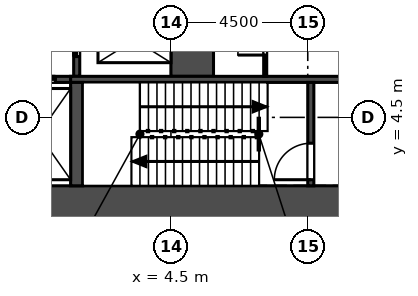
"""IFC4 building model, lengths in metres.
Left out: names, types, materials, properties, quantities, classifications, styles, units other than length and angle.
Written with IfcOpenShell. Run it as: python <this file> out.ifc"""

import sys

from ifc_helpers import new_model, si_unit, direction, frame, frame_2d, origin, place, context, subcontext, project, spatial, rectangle, extrude, element, fill, save


model = new_model("IFC4")
c1 = context("Model", 3, precision=1e-05, world=origin(), true_north=direction((0.0, 1.0)))
c2 = subcontext(c1, "Body", "Model", "MODEL_VIEW")
j1 = project(units=[si_unit("LENGTHUNIT", "METRE"), si_unit("PLANEANGLEUNIT", "RADIAN")], contexts=[c1])
p1 = place(None, origin())
s1 = spatial("IfcSite", under=j1, at=p1, CompositionType="ELEMENT")
p2 = place(p1, origin())
s2 = spatial("IfcBuilding", under=s1, at=p2, CompositionType="ELEMENT")
p3 = place(p2, frame((0.0, 0.0, 20.0)))
s3 = spatial("IfcBuildingStorey", under=s2, at=p3, CompositionType="ELEMENT", Elevation=20.0)
p4 = place(p3, frame((-14.0, 1.55, 0.0), z_axis=(0.0, 0.0, 1.0), x_axis=(1.0, 0.0, 0.0)))
e1 = element("IfcWall", 1, at=p4, inside=s3, PredefinedType="SHEAR", context=c2, shape_type="SweptSolid", body=[
    extrude(rectangle(XDim=28.0, YDim=1.4, at=frame_2d((14.0, 0.0))), origin(), (0.0, 0.0, 1.0), 5.0),
])
p5 = place(p3, frame((1.4, 5.85, -0.3), z_axis=(0.0, 0.0, 1.0), x_axis=(0.0, 1.0, 0.0)))
e2 = element("IfcWall", 2, at=p5, inside=s3, PredefinedType="SOLIDWALL", context=c2, shape_type="SweptSolid", body=[
    extrude(rectangle(XDim=11.75, YDim=0.2, at=frame_2d((5.875, 0.0))), origin(), (0.0, 0.0, 1.0), 3.3),
])
p6 = place(p5, frame((0.65, 0.0, 0.3)))
e3 = element("IfcOpeningElement", 3, at=p6, cuts=e2, PredefinedType="OPENING", context=c2, shape_type="SweptSolid", body=[
    extrude(rectangle(XDim=1.1, YDim=2.1, at=frame_2d((0.55, 1.05))), frame((0.0, 0.11, 0.0), z_axis=(0.0, -1.0, 0.0), x_axis=(1.0, 0.0, 0.0)), (0.0, 0.0, 1.0), 0.22),
])
p7 = place(p5, frame((3.3, 0.0, 0.3)))
e4 = element("IfcOpeningElement", 4, at=p7, cuts=e2, PredefinedType="OPENING", context=c2, shape_type="SweptSolid", body=[
    extrude(rectangle(XDim=1.0, YDim=2.1, at=frame_2d((0.5, 1.05))), frame((0.0, 0.11, 0.0), z_axis=(0.0, -1.0, 0.0), x_axis=(1.0, 0.0, 0.0)), (0.0, 0.0, 1.0), 0.22),
])
p8 = place(p3, frame((5.2, 5.85, -0.3), z_axis=(0.0, 0.0, 1.0), x_axis=(0.0, 1.0, 0.0)))
e5 = element("IfcWall", 5, at=p8, inside=s3, PredefinedType="SOLIDWALL", context=c2, shape_type="SweptSolid", body=[
    extrude(rectangle(XDim=2.4, YDim=1.4, at=frame_2d((1.2, 0.0))), origin(), (0.0, 0.0, 1.0), 3.3),
])
p9 = place(p3, frame((-1.2, 5.75, -0.3), z_axis=(0.0, 0.0, 1.0), x_axis=(1.0, 0.0, 0.0)))
e6 = element("IfcWall", 6, at=p9, inside=s3, PredefinedType="SOLIDWALL", context=c2, shape_type="SweptSolid", body=[
    extrude(rectangle(XDim=2.4, YDim=0.2, at=frame_2d((1.2, 0.0))), origin(), (0.0, 0.0, 1.0), 3.3),
])
p10 = place(p9, frame((0.5, 0.0, 0.3)))
e7 = element("IfcOpeningElement", 7, at=p10, cuts=e6, PredefinedType="OPENING", context=c2, shape_type="SweptSolid", body=[
    extrude(rectangle(XDim=1.4, YDim=2.1, at=frame_2d((0.7, 1.05))), frame((0.0, 0.11, 0.0), z_axis=(0.0, -1.0, 0.0), x_axis=(1.0, 0.0, 0.0)), (0.0, 0.0, 1.0), 0.22),
])
p11 = place(p3, frame((1.2, 5.75, -0.3), z_axis=(0.0, 0.0, 1.0), x_axis=(1.0, 0.0, 0.0)))
e8 = element("IfcWall", 8, at=p11, inside=s3, PredefinedType="SOLIDWALL", context=c2, shape_type="SweptSolid", body=[
    extrude(rectangle(XDim=11.4, YDim=0.2, at=frame_2d((5.7, 0.0))), origin(), (0.0, 0.0, 1.0), 3.3),
])
p12 = place(p3, frame((9.1, 2.25, -0.3), z_axis=(0.0, 0.0, 1.0), x_axis=(0.0, 1.0, 0.0)))
e9 = element("IfcWall", 9, at=p12, inside=s3, PredefinedType="SOLIDWALL", context=c2, shape_type="SweptSolid", body=[
    extrude(rectangle(XDim=3.4, YDim=0.2, at=frame_2d((1.7, 0.0))), origin(), (0.0, 0.0, 1.0), 3.3),
])
p13 = place(p12, frame((0.2, 0.0, 0.3)))
e10 = element("IfcOpeningElement", 10, at=p13, cuts=e9, PredefinedType="OPENING", context=c2, shape_type="SweptSolid", body=[
    extrude(rectangle(XDim=1.2, YDim=2.1, at=frame_2d((0.6, 1.05))), frame((0.0, 0.11, 0.0), z_axis=(0.0, -1.0, 0.0), x_axis=(1.0, 0.0, 0.0)), (0.0, 0.0, 1.0), 0.22),
])
p14 = place(p3, frame((1.4, 2.25, -0.3), z_axis=(0.0, 0.0, 1.0), x_axis=(0.0, 1.0, 0.0)))
e11 = element("IfcWall", 11, at=p14, inside=s3, PredefinedType="SOLIDWALL", context=c2, shape_type="SweptSolid", body=[
    extrude(rectangle(XDim=3.4, YDim=0.4, at=frame_2d((1.7, 0.0))), origin(), (0.0, 0.0, 1.0), 3.3),
])
p15 = place(p3, frame((7.6, 5.85, 0.0), z_axis=(0.0, 0.0, 1.0), x_axis=(0.0, 1.0, 0.0)))
e12 = element("IfcWall", 12, at=p15, inside=s3, PredefinedType="PARTITIONING", context=c2, shape_type="SweptSolid", body=[
    extrude(rectangle(XDim=2.4, YDim=0.1, at=frame_2d((1.2, 0.0))), origin(), (0.0, 0.0, 1.0), 3.0),
])
p16 = place(p15, frame((0.7, 0.0, 0.0)))
e13 = element("IfcOpeningElement", 13, at=p16, cuts=e12, PredefinedType="OPENING", context=c2, shape_type="SweptSolid", body=[
    extrude(rectangle(XDim=0.9, YDim=2.1, at=frame_2d((0.45, 1.05))), frame((0.0, 0.06, 0.0), z_axis=(0.0, -1.0, 0.0), x_axis=(1.0, 0.0, 0.0)), (0.0, 0.0, 1.0), 0.12),
])
p17 = place(p6, origin())
e14 = element("IfcDoor", 14, at=p17, inside=s3, OperationType="SLIDING_TO_RIGHT", PredefinedType="DOOR", context=c2, shape_type="SweptSolid", body=[
    extrude(rectangle(XDim=1.1, YDim=2.1, at=frame_2d((0.55, 1.05))), frame((0.0, 0.025, 0.0), z_axis=(0.0, -1.0, 0.0), x_axis=(1.0, 0.0, 0.0)), (0.0, 0.0, 1.0), 0.05),
])
fill(e3, e14)
p18 = place(p10, origin())
e15 = element("IfcDoor", 15, at=p18, inside=s3, OperationType="SLIDING_TO_LEFT", PredefinedType="DOOR", context=c2, shape_type="SweptSolid", body=[
    extrude(rectangle(XDim=1.4, YDim=2.1, at=frame_2d((0.7, 1.05))), frame((0.0, 0.025, 0.0), z_axis=(0.0, -1.0, 0.0), x_axis=(1.0, 0.0, 0.0)), (0.0, 0.0, 1.0), 0.05),
])
fill(e7, e15)
p19 = place(p16, origin())
e16 = element("IfcDoor", 16, at=p19, inside=s3, OperationType="SINGLE_SWING_LEFT", PredefinedType="DOOR", context=c2, shape_type="SweptSolid", body=[
    extrude(rectangle(XDim=0.9, YDim=2.1, at=frame_2d((0.45, 1.05))), frame((0.0, 0.025, 0.0), z_axis=(0.0, -1.0, 0.0), x_axis=(1.0, 0.0, 0.0)), (0.0, 0.0, 1.0), 0.05),
])
fill(e13, e16)
p20 = place(p13, origin())
e17 = element("IfcDoor", 17, at=p20, inside=s3, OperationType="SINGLE_SWING_LEFT", PredefinedType="DOOR", context=c2, shape_type="SweptSolid", body=[
    extrude(rectangle(XDim=1.2, YDim=2.1, at=frame_2d((0.6, 1.05))), frame((0.0, 0.025, 0.0), z_axis=(0.0, -1.0, 0.0), x_axis=(1.0, 0.0, 0.0)), (0.0, 0.0, 1.0), 0.05),
])
fill(e10, e17)
save(model, sys.argv[1])
